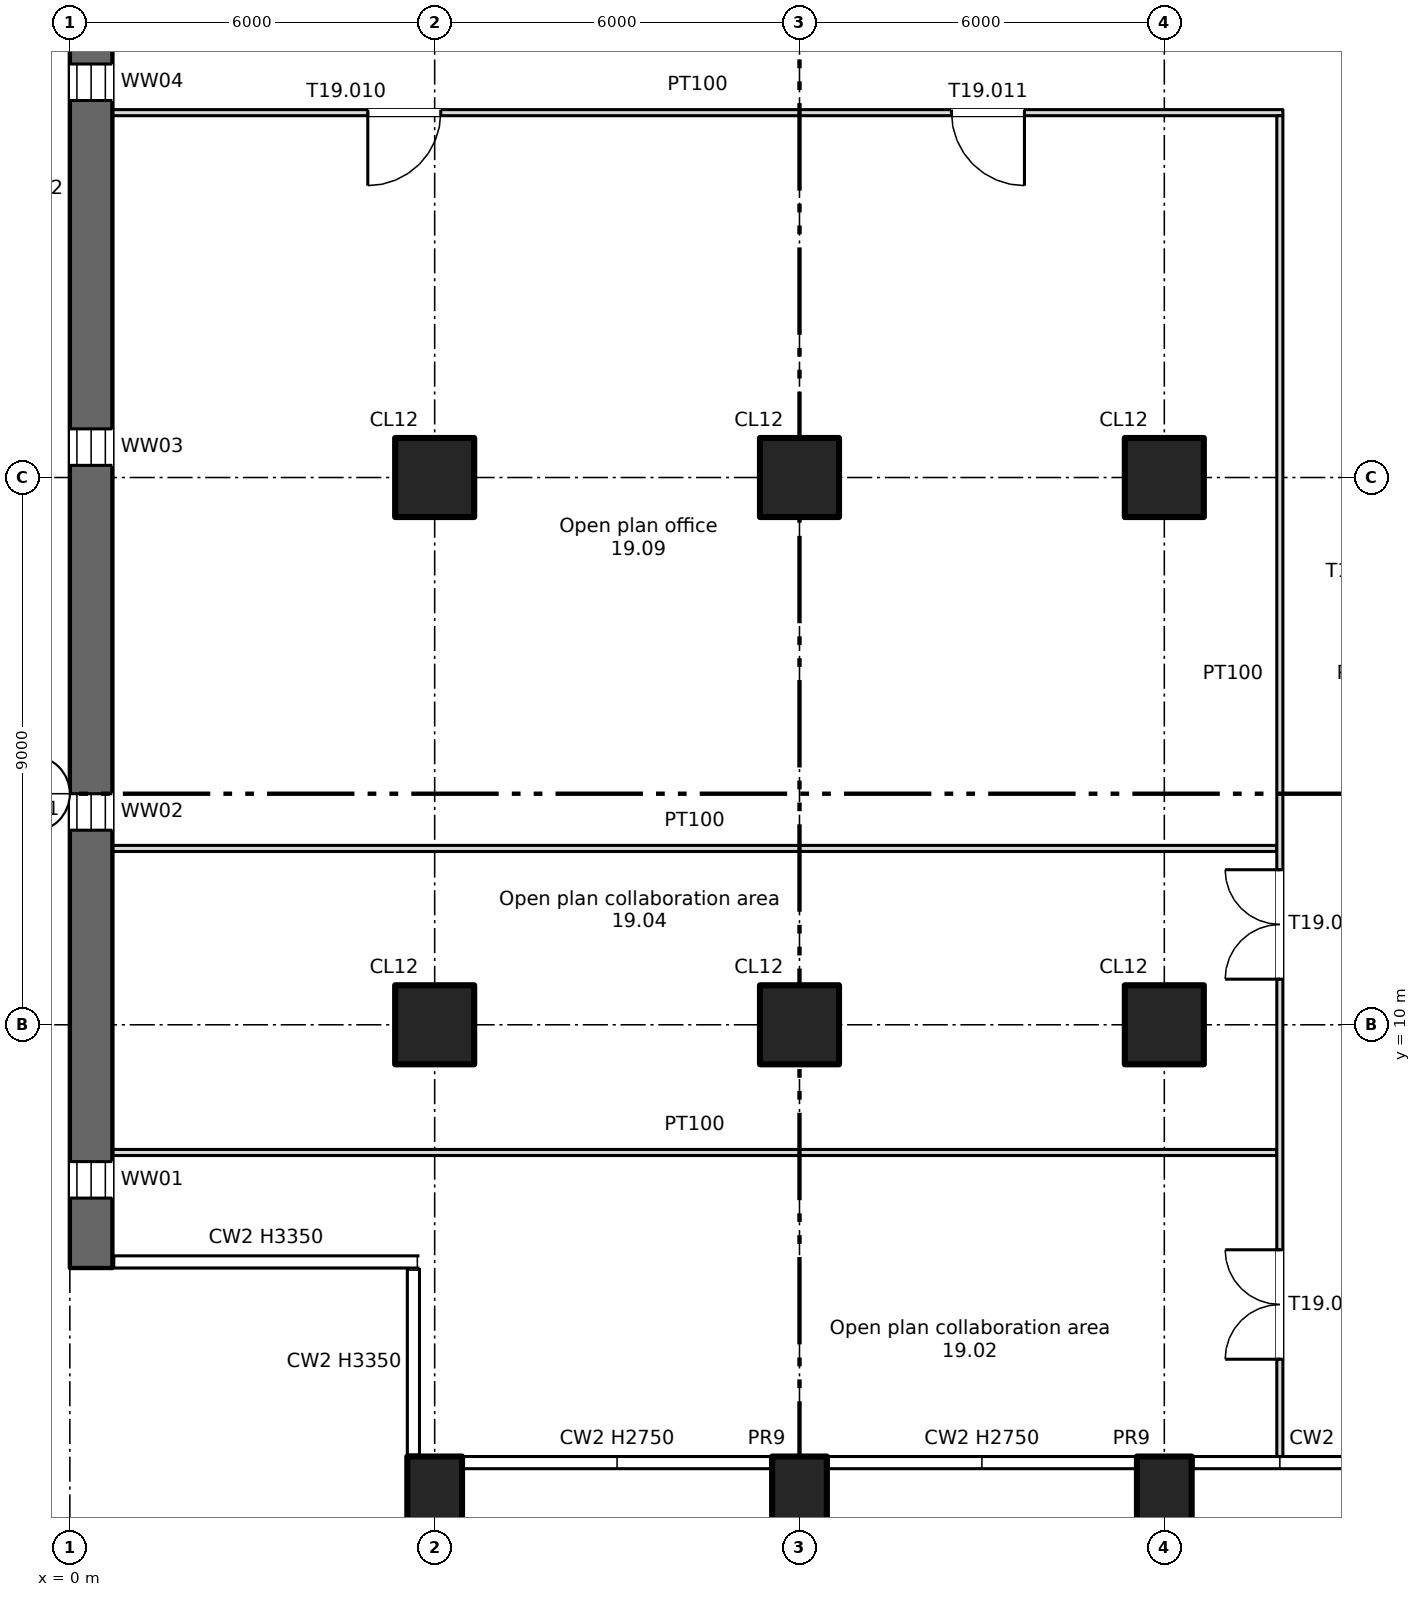
"""IFC4 building model, lengths in metres.
Left out: names, types, materials, properties, quantities, classifications, styles, units other than length and angle.
Written with IfcOpenShell. Run it as: python <this file> out.ifc"""

import sys

from ifc_helpers import new_model, si_unit, direction, frame, frame_2d, origin, origin_2d, place, context, subcontext, project, spatial, rectangle, extrude, element, fill, save


model = new_model("IFC4")
c1 = context("Model", 3, precision=1e-05, world=origin(), true_north=direction((0.0, 1.0)))
c2 = subcontext(c1, "Body", "Model", "MODEL_VIEW")
j1 = project(units=[si_unit("LENGTHUNIT", "METRE"), si_unit("PLANEANGLEUNIT", "RADIAN")], contexts=[c1])
p1 = place(None, origin())
s1 = spatial("IfcSite", under=j1, at=p1, CompositionType="ELEMENT")
p2 = place(p1, origin())
s2 = spatial("IfcBuilding", under=s1, at=p2, CompositionType="ELEMENT")
p3 = place(p2, frame((0.0, 0.0, 125.0)))
s3 = spatial("IfcBuildingStorey", under=s2, at=p3, CompositionType="ELEMENT", Elevation=125.0)
for number, where, z_axis, x_axis in (
    (1, (6.0, 2.2, -0.4), (0.0, 0.0, 1.0), (1.0, 0.0, 0.0)),
    (2, (12.0, 2.2, -0.4), (0.0, 0.0, 1.0), (1.0, 0.0, 0.0)),
    (3, (18.0, 2.2, -0.4), (0.0, 0.0, 1.0), (1.0, 0.0, 0.0)),
):
    element("IfcColumn", number, at=place(p3, frame(where, z_axis=z_axis, x_axis=x_axis)), inside=s3, PredefinedType="COLUMN", context=c2, shape_type="SweptSolid", body=[
        extrude(rectangle(XDim=0.9, YDim=1.4, at=origin_2d()), origin(), (0.0, 0.0, 1.0), 3.75),
    ])
for number, where, z_axis, x_axis in (
    (4, (6.0, 10.0, 0.0), (0.0, 0.0, 1.0), (1.0, 0.0, 0.0)),
    (5, (6.0, 19.0, 0.0), (0.0, 0.0, 1.0), (1.0, 0.0, 0.0)),
    (6, (12.0, 10.0, 0.0), (0.0, 0.0, 1.0), (1.0, 0.0, 0.0)),
    (7, (12.0, 19.0, 0.0), (0.0, 0.0, 1.0), (1.0, 0.0, 0.0)),
    (8, (18.0, 10.0, 0.0), (0.0, 0.0, 1.0), (1.0, 0.0, 0.0)),
    (9, (18.0, 19.0, 0.0), (0.0, 0.0, 1.0), (1.0, 0.0, 0.0)),
):
    element("IfcColumn", number, at=place(p3, frame(where, z_axis=z_axis, x_axis=x_axis)), inside=s3, PredefinedType="COLUMN", context=c2, shape_type="SweptSolid", body=[
        extrude(rectangle(XDim=1.3, YDim=1.3, at=origin_2d()), origin(), (0.0, 0.0, 1.0), 3.35),
    ])
p4 = place(p3, frame((0.35, 6.0, 0.0), z_axis=(0.0, 0.0, 1.0), x_axis=(0.0, 1.0, 0.0)))
e10 = element("IfcWall", 10, at=p4, inside=s3, PredefinedType="SHEAR", context=c2, shape_type="SweptSolid", body=[
    extrude(rectangle(XDim=35.5, YDim=0.7, at=frame_2d((17.75, 0.0))), origin(), (0.0, 0.0, 1.0), 3.35),
])
p5 = place(p4, frame((1.15, 0.0, 0.6)))
e11 = element("IfcOpeningElement", 11, at=p5, cuts=e10, PredefinedType="OPENING", context=c2, shape_type="SweptSolid", body=[
    extrude(rectangle(XDim=0.6, YDim=2.4, at=frame_2d((0.3, 1.2))), frame((0.0, 0.36, 0.0), z_axis=(0.0, -1.0, 0.0), x_axis=(1.0, 0.0, 0.0)), (0.0, 0.0, 1.0), 0.72),
])
p6 = place(p4, frame((7.2, 0.0, 0.6)))
e12 = element("IfcOpeningElement", 12, at=p6, cuts=e10, PredefinedType="OPENING", context=c2, shape_type="SweptSolid", body=[
    extrude(rectangle(XDim=0.6, YDim=2.4, at=frame_2d((0.3, 1.2))), frame((0.0, 0.36, 0.0), z_axis=(0.0, -1.0, 0.0), x_axis=(1.0, 0.0, 0.0)), (0.0, 0.0, 1.0), 0.72),
])
p7 = place(p4, frame((13.2, 0.0, 0.6)))
e13 = element("IfcOpeningElement", 13, at=p7, cuts=e10, PredefinedType="OPENING", context=c2, shape_type="SweptSolid", body=[
    extrude(rectangle(XDim=0.6, YDim=2.4, at=frame_2d((0.3, 1.2))), frame((0.0, 0.36, 0.0), z_axis=(0.0, -1.0, 0.0), x_axis=(1.0, 0.0, 0.0)), (0.0, 0.0, 1.0), 0.72),
])
p8 = place(p4, frame((19.2, 0.0, 0.6)))
e14 = element("IfcOpeningElement", 14, at=p8, cuts=e10, PredefinedType="OPENING", context=c2, shape_type="SweptSolid", body=[
    extrude(rectangle(XDim=0.6, YDim=2.4, at=frame_2d((0.3, 1.2))), frame((0.0, 0.36, 0.0), z_axis=(0.0, -1.0, 0.0), x_axis=(1.0, 0.0, 0.0)), (0.0, 0.0, 1.0), 0.72),
])
p9 = place(p4, frame((25.2, 0.0, 0.6)))
e15 = element("IfcOpeningElement", 15, at=p9, cuts=e10, PredefinedType="OPENING", context=c2, shape_type="SweptSolid", body=[
    extrude(rectangle(XDim=0.6, YDim=2.4, at=frame_2d((0.3, 1.2))), frame((0.0, 0.36, 0.0), z_axis=(0.0, -1.0, 0.0), x_axis=(1.0, 0.0, 0.0)), (0.0, 0.0, 1.0), 0.72),
])
p10 = place(p4, frame((31.2, 0.0, 0.6)))
e16 = element("IfcOpeningElement", 16, at=p10, cuts=e10, PredefinedType="OPENING", context=c2, shape_type="SweptSolid", body=[
    extrude(rectangle(XDim=0.6, YDim=2.4, at=frame_2d((0.3, 1.2))), frame((0.0, 0.36, 0.0), z_axis=(0.0, -1.0, 0.0), x_axis=(1.0, 0.0, 0.0)), (0.0, 0.0, 1.0), 0.72),
])
for number, where, z_axis, x_axis in (
    (17, (0.7, 7.9, 0.0), (0.0, 0.0, 1.0), (1.0, 0.0, 0.0)),
    (18, (0.7, 12.9, 0.0), (0.0, 0.0, 1.0), (1.0, 0.0, 0.0)),
):
    element("IfcWall", number, at=place(p3, frame(where, z_axis=z_axis, x_axis=x_axis)), inside=s3, PredefinedType="PARTITIONING", context=c2, shape_type="SweptSolid", body=[
        extrude(rectangle(XDim=19.15, YDim=0.1, at=frame_2d((9.575, 0.0))), origin(), (0.0, 0.0, 1.0), 3.35),
    ])
p11 = place(p3, frame((0.7, 25.0, 0.0), z_axis=(0.0, 0.0, 1.0), x_axis=(1.0, 0.0, 0.0)))
e19 = element("IfcWall", 19, at=p11, inside=s3, PredefinedType="PARTITIONING", context=c2, shape_type="SweptSolid", body=[
    extrude(rectangle(XDim=19.25, YDim=0.1, at=frame_2d((9.625, 0.0))), origin(), (0.0, 0.0, 1.0), 3.35),
])
p12 = place(p11, frame((4.2, 0.0, 0.0)))
e20 = element("IfcOpeningElement", 20, at=p12, cuts=e19, PredefinedType="OPENING", context=c2, shape_type="SweptSolid", body=[
    extrude(rectangle(XDim=1.2, YDim=2.1, at=frame_2d((0.6, 1.05))), frame((0.0, 0.06, 0.0), z_axis=(0.0, -1.0, 0.0), x_axis=(1.0, 0.0, 0.0)), (0.0, 0.0, 1.0), 0.12),
])
p13 = place(p11, frame((13.8, 0.0, 0.0)))
e21 = element("IfcOpeningElement", 21, at=p13, cuts=e19, PredefinedType="OPENING", context=c2, shape_type="SweptSolid", body=[
    extrude(rectangle(XDim=1.2, YDim=2.1, at=frame_2d((0.6, 1.05))), frame((0.0, 0.06, 0.0), z_axis=(0.0, -1.0, 0.0), x_axis=(1.0, 0.0, 0.0)), (0.0, 0.0, 1.0), 0.12),
])
p14 = place(p3, frame((19.9, 2.9, 0.0), z_axis=(0.0, 0.0, 1.0), x_axis=(0.0, 1.0, 0.0)))
e22 = element("IfcWall", 22, at=p14, inside=s3, PredefinedType="PARTITIONING", context=c2, shape_type="SweptSolid", body=[
    extrude(rectangle(XDim=22.05, YDim=0.1, at=frame_2d((11.025, 0.0))), origin(), (0.0, 0.0, 1.0), 3.35),
])
p15 = place(p14, frame((1.6, 0.0, 0.0)))
e23 = element("IfcOpeningElement", 23, at=p15, cuts=e22, PredefinedType="OPENING", context=c2, shape_type="SweptSolid", body=[
    extrude(rectangle(XDim=1.8, YDim=2.1, at=frame_2d((0.9, 1.05))), frame((0.0, 0.06, 0.0), z_axis=(0.0, -1.0, 0.0), x_axis=(1.0, 0.0, 0.0)), (0.0, 0.0, 1.0), 0.12),
])
p16 = place(p14, frame((7.85, 0.0, 0.0)))
e24 = element("IfcOpeningElement", 24, at=p16, cuts=e22, PredefinedType="OPENING", context=c2, shape_type="SweptSolid", body=[
    extrude(rectangle(XDim=1.8, YDim=2.1, at=frame_2d((0.9, 1.05))), frame((0.0, 0.06, 0.0), z_axis=(0.0, -1.0, 0.0), x_axis=(1.0, 0.0, 0.0)), (0.0, 0.0, 1.0), 0.12),
])
p17 = place(p5, origin())
e25 = element("IfcWindow", 25, at=p17, inside=s3, PartitioningType="SINGLE_PANEL", PredefinedType="WINDOW", context=c2, shape_type="SweptSolid", body=[
    extrude(rectangle(XDim=0.6, YDim=2.4, at=frame_2d((0.3, 1.2))), frame((0.0, 0.03, 0.0), z_axis=(0.0, -1.0, 0.0), x_axis=(1.0, 0.0, 0.0)), (0.0, 0.0, 1.0), 0.06),
])
fill(e11, e25)
p18 = place(p6, origin())
e26 = element("IfcWindow", 26, at=p18, inside=s3, PartitioningType="SINGLE_PANEL", PredefinedType="WINDOW", context=c2, shape_type="SweptSolid", body=[
    extrude(rectangle(XDim=0.6, YDim=2.4, at=frame_2d((0.3, 1.2))), frame((0.0, 0.03, 0.0), z_axis=(0.0, -1.0, 0.0), x_axis=(1.0, 0.0, 0.0)), (0.0, 0.0, 1.0), 0.06),
])
fill(e12, e26)
p19 = place(p7, origin())
e27 = element("IfcWindow", 27, at=p19, inside=s3, PartitioningType="SINGLE_PANEL", PredefinedType="WINDOW", context=c2, shape_type="SweptSolid", body=[
    extrude(rectangle(XDim=0.6, YDim=2.4, at=frame_2d((0.3, 1.2))), frame((0.0, 0.03, 0.0), z_axis=(0.0, -1.0, 0.0), x_axis=(1.0, 0.0, 0.0)), (0.0, 0.0, 1.0), 0.06),
])
fill(e13, e27)
p20 = place(p8, origin())
e28 = element("IfcWindow", 28, at=p20, inside=s3, PartitioningType="SINGLE_PANEL", PredefinedType="WINDOW", context=c2, shape_type="SweptSolid", body=[
    extrude(rectangle(XDim=0.6, YDim=2.4, at=frame_2d((0.3, 1.2))), frame((0.0, 0.03, 0.0), z_axis=(0.0, -1.0, 0.0), x_axis=(1.0, 0.0, 0.0)), (0.0, 0.0, 1.0), 0.06),
])
fill(e14, e28)
p21 = place(p15, origin())
e29 = element("IfcDoor", 29, at=p21, inside=s3, OperationType="DOUBLE_DOOR_SINGLE_SWING", PredefinedType="DOOR", context=c2, shape_type="SweptSolid", body=[
    extrude(rectangle(XDim=1.8, YDim=2.1, at=frame_2d((0.9, 1.05))), frame((0.0, 0.025, 0.0), z_axis=(0.0, -1.0, 0.0), x_axis=(1.0, 0.0, 0.0)), (0.0, 0.0, 1.0), 0.05),
])
fill(e23, e29)
p22 = place(p16, origin())
e30 = element("IfcDoor", 30, at=p22, inside=s3, OperationType="DOUBLE_DOOR_SINGLE_SWING", PredefinedType="DOOR", context=c2, shape_type="SweptSolid", body=[
    extrude(rectangle(XDim=1.8, YDim=2.1, at=frame_2d((0.9, 1.05))), frame((0.0, 0.025, 0.0), z_axis=(0.0, -1.0, 0.0), x_axis=(1.0, 0.0, 0.0)), (0.0, 0.0, 1.0), 0.05),
])
fill(e24, e30)
p23 = place(p12, origin())
e31 = element("IfcDoor", 31, at=p23, inside=s3, OperationType="SINGLE_SWING_LEFT", PredefinedType="DOOR", context=c2, shape_type="SweptSolid", body=[
    extrude(rectangle(XDim=1.2, YDim=2.1, at=frame_2d((0.6, 1.05))), frame((0.0, 0.025, 0.0), z_axis=(0.0, -1.0, 0.0), x_axis=(1.0, 0.0, 0.0)), (0.0, 0.0, 1.0), 0.05),
])
fill(e20, e31)
p24 = place(p13, origin())
e32 = element("IfcDoor", 32, at=p24, inside=s3, OperationType="SINGLE_SWING_RIGHT", PredefinedType="DOOR", context=c2, shape_type="SweptSolid", body=[
    extrude(rectangle(XDim=1.2, YDim=2.1, at=frame_2d((0.6, 1.05))), frame((0.0, 0.025, 0.0), z_axis=(0.0, -1.0, 0.0), x_axis=(1.0, 0.0, 0.0)), (0.0, 0.0, 1.0), 0.05),
])
fill(e21, e32)
save(model, sys.argv[1])
